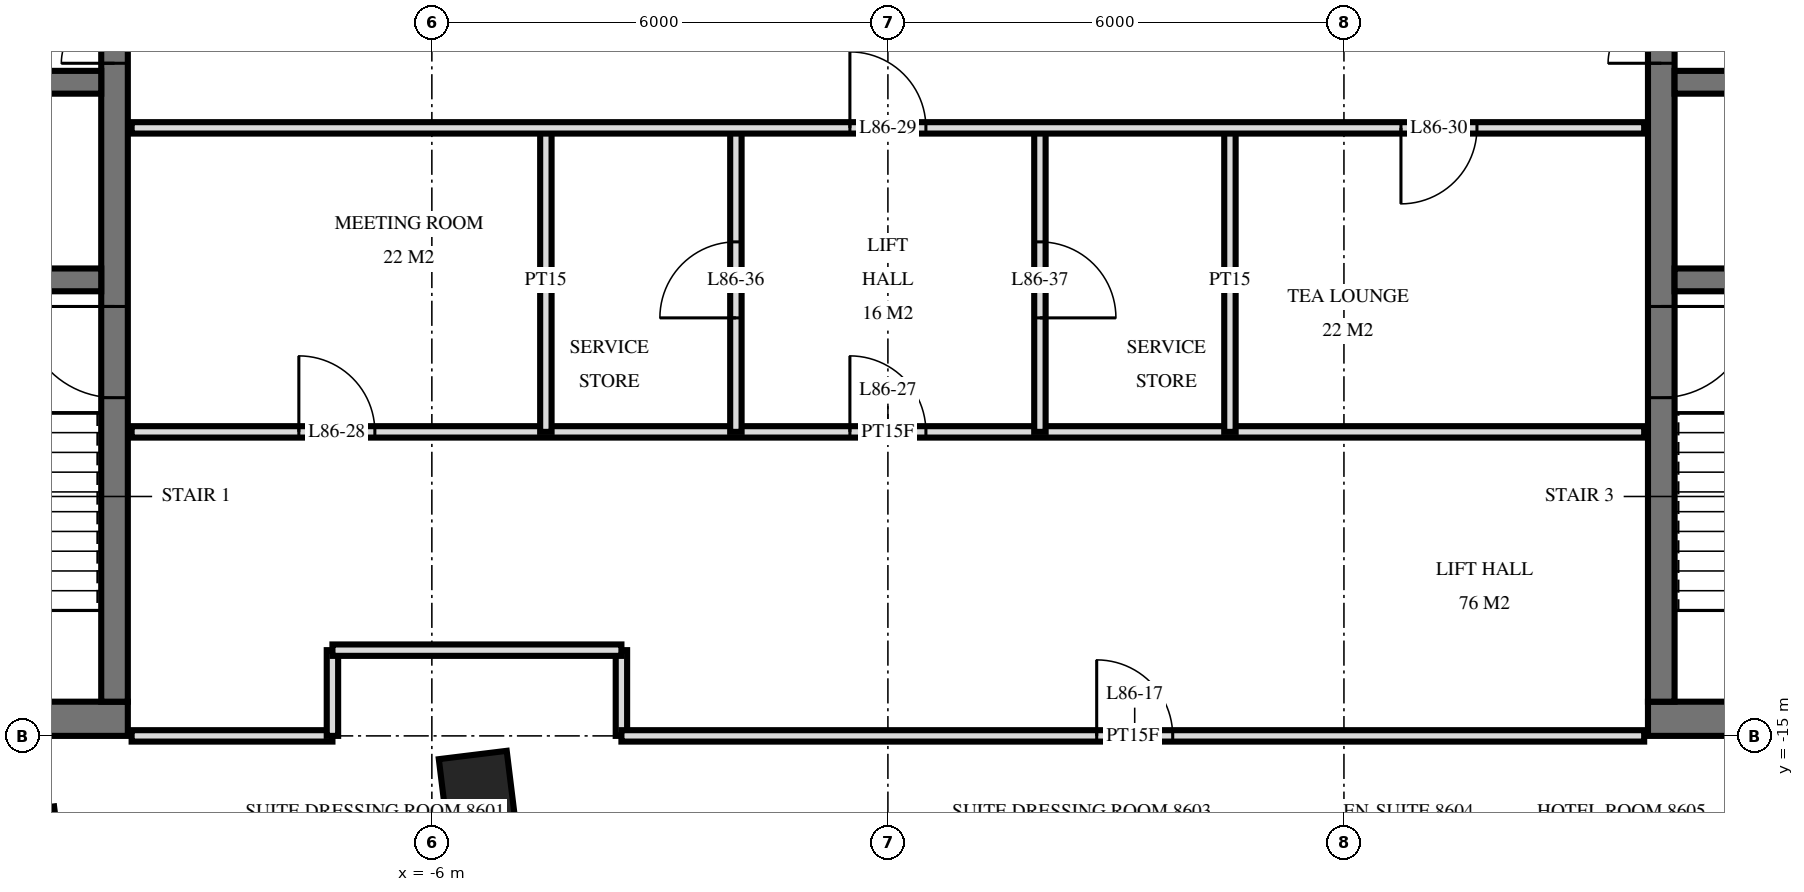
"""IFC4 building model, lengths in metres.
Left out: names, types, materials, properties, quantities, classifications, styles, units other than length and angle.
Written with IfcOpenShell. Run it as: python <this file> out.ifc"""

import sys

from ifc_helpers import new_model, si_unit, direction, frame, frame_2d, origin, origin_2d, place, context, subcontext, project, spatial, rectangle, extrude, element, fill, save


model = new_model("IFC4")
c1 = context("Model", 3, precision=1e-05, world=origin(), true_north=direction((0.0, 1.0)))
c2 = subcontext(c1, "Body", "Model", "MODEL_VIEW")
j1 = project(units=[si_unit("LENGTHUNIT", "METRE"), si_unit("PLANEANGLEUNIT", "RADIAN")], contexts=[c1])
p1 = place(None, origin())
s1 = spatial("IfcSite", under=j1, at=p1, CompositionType="ELEMENT")
p2 = place(p1, origin())
s2 = spatial("IfcBuilding", under=s1, at=p2, CompositionType="ELEMENT")
p3 = place(p2, frame((0.0, 0.0, 326.6)))
s3 = spatial("IfcBuildingStorey", under=s2, at=p3, CompositionType="ELEMENT", Elevation=326.6)
for number, where, z_axis, x_axis in (
    (1, (-11.362, -16.429, 0.0), (0.0, 0.0, 1.0), (0.993, 0.122, 0.0)),
    (2, (-5.407, -15.698, 0.0), (0.0, 0.0, 1.0), (0.993, 0.122, 0.0)),
):
    element("IfcColumn", number, at=place(p3, frame(where, z_axis=z_axis, x_axis=x_axis)), inside=s3, PredefinedType="COLUMN", context=c2, shape_type="SweptSolid", body=[
        extrude(rectangle(XDim=0.9, YDim=0.9, at=origin_2d()), origin(), (0.0, 0.0, 1.0), 4.0),
    ])
p4 = place(p3, frame((-19.5, -14.775, 0.0), z_axis=(0.0, 0.0, 1.0), x_axis=(1.0, 0.0, 0.0)))
e3 = element("IfcWall", 3, at=p4, inside=s3, PredefinedType="SHEAR", context=c2, shape_type="SweptSolid", body=[
    extrude(rectangle(XDim=9.5, YDim=0.45, at=frame_2d((4.75, 0.0))), origin(), (0.0, 0.0, 1.0), 4.0),
])
p5 = place(p4, frame((1.2, 0.0, 0.0)))
e4 = element("IfcOpeningElement", 4, at=p5, cuts=e3, PredefinedType="OPENING", context=c2, shape_type="SweptSolid", body=[
    extrude(rectangle(XDim=1.2, YDim=2.1, at=frame_2d((0.6, 1.05))), frame((0.0, 0.235, 0.0), z_axis=(0.0, -1.0, 0.0), x_axis=(1.0, 0.0, 0.0)), (0.0, 0.0, 1.0), 0.47),
])
p6 = place(p4, frame((4.25, 0.0, 0.0)))
e5 = element("IfcOpeningElement", 5, at=p6, cuts=e3, PredefinedType="OPENING", context=c2, shape_type="SweptSolid", body=[
    extrude(rectangle(XDim=1.1, YDim=2.1, at=frame_2d((0.55, 1.05))), frame((0.0, 0.235, 0.0), z_axis=(0.0, -1.0, 0.0), x_axis=(1.0, 0.0, 0.0)), (0.0, 0.0, 1.0), 0.47),
])
p7 = place(p3, frame((-10.175, -14.55, 0.0), z_axis=(0.0, 0.0, 1.0), x_axis=(0.0, 1.0, 0.0)))
e6 = element("IfcWall", 6, at=p7, inside=s3, PredefinedType="SHEAR", context=c2, shape_type="SweptSolid", body=[
    extrude(rectangle(XDim=14.1, YDim=0.35, at=frame_2d((7.05, 0.0))), origin(), (0.0, 0.0, 1.0), 4.0),
])
p8 = place(p7, frame((8.4, 0.0, 0.0)))
e7 = element("IfcOpeningElement", 7, at=p8, cuts=e6, PredefinedType="OPENING", context=c2, shape_type="SweptSolid", body=[
    extrude(rectangle(XDim=1.4, YDim=2.4, at=frame_2d((0.7, 1.2))), frame((0.0, 0.185, 0.0), z_axis=(0.0, -1.0, 0.0), x_axis=(1.0, 0.0, 0.0)), (0.0, 0.0, 1.0), 0.37),
])
p9 = place(p7, frame((10.0, 0.0, 0.0)))
e8 = element("IfcOpeningElement", 8, at=p9, cuts=e6, PredefinedType="OPENING", context=c2, shape_type="SweptSolid", body=[
    extrude(rectangle(XDim=1.4, YDim=2.4, at=frame_2d((0.7, 1.2))), frame((0.0, 0.185, 0.0), z_axis=(0.0, -1.0, 0.0), x_axis=(1.0, 0.0, 0.0)), (0.0, 0.0, 1.0), 0.37),
])
p10 = place(p7, frame((4.0, 0.0, 0.0)))
e9 = element("IfcOpeningElement", 9, at=p10, cuts=e6, PredefinedType="OPENING", context=c2, shape_type="SweptSolid", body=[
    extrude(rectangle(XDim=1.2, YDim=2.1, at=frame_2d((0.6, 1.05))), frame((0.0, 0.185, 0.0), z_axis=(0.0, -1.0, 0.0), x_axis=(1.0, 0.0, 0.0)), (0.0, 0.0, 1.0), 0.37),
])
p11 = place(p3, frame((-19.05, -6.4, 0.0), z_axis=(0.0, 0.0, 1.0), x_axis=(1.0, 0.0, 0.0)))
e10 = element("IfcWall", 10, at=p11, inside=s3, PredefinedType="SHEAR", context=c2, shape_type="SweptSolid", body=[
    extrude(rectangle(XDim=8.7, YDim=0.3, at=frame_2d((4.35, 0.0))), origin(), (0.0, 0.0, 1.0), 4.0),
])
p12 = place(p11, frame((0.8, 0.0, 0.0)))
e11 = element("IfcOpeningElement", 11, at=p12, cuts=e10, PredefinedType="OPENING", context=c2, shape_type="SweptSolid", body=[
    extrude(rectangle(XDim=1.1, YDim=2.1, at=frame_2d((0.55, 1.05))), frame((0.0, 0.16, 0.0), z_axis=(0.0, -1.0, 0.0), x_axis=(1.0, 0.0, 0.0)), (0.0, 0.0, 1.0), 0.32),
])
p13 = place(p3, frame((-19.05, -9.0, 0.0), z_axis=(0.0, 0.0, 1.0), x_axis=(1.0, 0.0, 0.0)))
e12 = element("IfcWall", 12, at=p13, inside=s3, PredefinedType="SHEAR", context=c2, shape_type="SweptSolid", body=[
    extrude(rectangle(XDim=8.7, YDim=0.3, at=frame_2d((4.35, 0.0))), origin(), (0.0, 0.0, 1.0), 4.0),
])
p14 = place(p13, frame((3.8, 0.0, 0.0)))
e13 = element("IfcOpeningElement", 13, at=p14, cuts=e12, PredefinedType="OPENING", context=c2, shape_type="SweptSolid", body=[
    extrude(rectangle(XDim=1.1, YDim=2.1, at=frame_2d((0.55, 1.05))), frame((0.0, 0.16, 0.0), z_axis=(0.0, -1.0, 0.0), x_axis=(1.0, 0.0, 0.0)), (0.0, 0.0, 1.0), 0.32),
])
p15 = place(p3, frame((10.0, -14.775, 0.0), z_axis=(0.0, 0.0, 1.0), x_axis=(1.0, 0.0, 0.0)))
e14 = element("IfcWall", 14, at=p15, inside=s3, PredefinedType="SHEAR", context=c2, shape_type="SweptSolid", body=[
    extrude(rectangle(XDim=9.5, YDim=0.45, at=frame_2d((4.75, 0.0))), origin(), (0.0, 0.0, 1.0), 4.0),
])
p16 = place(p15, frame((7.1, 0.0, 0.0)))
e15 = element("IfcOpeningElement", 15, at=p16, cuts=e14, PredefinedType="OPENING", context=c2, shape_type="SweptSolid", body=[
    extrude(rectangle(XDim=1.2, YDim=2.1, at=frame_2d((0.6, 1.05))), frame((0.0, 0.235, 0.0), z_axis=(0.0, -1.0, 0.0), x_axis=(1.0, 0.0, 0.0)), (0.0, 0.0, 1.0), 0.47),
])
p17 = place(p15, frame((4.15, 0.0, 0.0)))
e16 = element("IfcOpeningElement", 16, at=p17, cuts=e14, PredefinedType="OPENING", context=c2, shape_type="SweptSolid", body=[
    extrude(rectangle(XDim=1.1, YDim=2.1, at=frame_2d((0.55, 1.05))), frame((0.0, 0.235, 0.0), z_axis=(0.0, -1.0, 0.0), x_axis=(1.0, 0.0, 0.0)), (0.0, 0.0, 1.0), 0.47),
])
p18 = place(p3, frame((10.175, -14.55, 0.0), z_axis=(0.0, 0.0, 1.0), x_axis=(0.0, 1.0, 0.0)))
e17 = element("IfcWall", 17, at=p18, inside=s3, PredefinedType="SHEAR", context=c2, shape_type="SweptSolid", body=[
    extrude(rectangle(XDim=14.1, YDim=0.35, at=frame_2d((7.05, 0.0))), origin(), (0.0, 0.0, 1.0), 4.0),
])
p19 = place(p18, frame((8.4, 0.0, 0.0)))
e18 = element("IfcOpeningElement", 18, at=p19, cuts=e17, PredefinedType="OPENING", context=c2, shape_type="SweptSolid", body=[
    extrude(rectangle(XDim=1.4, YDim=2.4, at=frame_2d((0.7, 1.2))), frame((0.0, 0.185, 0.0), z_axis=(0.0, -1.0, 0.0), x_axis=(1.0, 0.0, 0.0)), (0.0, 0.0, 1.0), 0.37),
])
p20 = place(p18, frame((10.0, 0.0, 0.0)))
e19 = element("IfcOpeningElement", 19, at=p20, cuts=e17, PredefinedType="OPENING", context=c2, shape_type="SweptSolid", body=[
    extrude(rectangle(XDim=1.4, YDim=2.4, at=frame_2d((0.7, 1.2))), frame((0.0, 0.185, 0.0), z_axis=(0.0, -1.0, 0.0), x_axis=(1.0, 0.0, 0.0)), (0.0, 0.0, 1.0), 0.37),
])
p21 = place(p18, frame((4.0, 0.0, 0.0)))
e20 = element("IfcOpeningElement", 20, at=p21, cuts=e17, PredefinedType="OPENING", context=c2, shape_type="SweptSolid", body=[
    extrude(rectangle(XDim=1.2, YDim=2.1, at=frame_2d((0.6, 1.05))), frame((0.0, 0.185, 0.0), z_axis=(0.0, -1.0, 0.0), x_axis=(1.0, 0.0, 0.0)), (0.0, 0.0, 1.0), 0.37),
])
p22 = place(p3, frame((10.35, -6.4, 0.0), z_axis=(0.0, 0.0, 1.0), x_axis=(1.0, 0.0, 0.0)))
e21 = element("IfcWall", 21, at=p22, inside=s3, PredefinedType="SHEAR", context=c2, shape_type="SweptSolid", body=[
    extrude(rectangle(XDim=8.7, YDim=0.3, at=frame_2d((4.35, 0.0))), origin(), (0.0, 0.0, 1.0), 4.0),
])
p23 = place(p22, frame((6.8, 0.0, 0.0)))
e22 = element("IfcOpeningElement", 22, at=p23, cuts=e21, PredefinedType="OPENING", context=c2, shape_type="SweptSolid", body=[
    extrude(rectangle(XDim=1.1, YDim=2.1, at=frame_2d((0.55, 1.05))), frame((0.0, 0.16, 0.0), z_axis=(0.0, -1.0, 0.0), x_axis=(1.0, 0.0, 0.0)), (0.0, 0.0, 1.0), 0.32),
])
p24 = place(p3, frame((10.35, -9.0, 0.0), z_axis=(0.0, 0.0, 1.0), x_axis=(1.0, 0.0, 0.0)))
e23 = element("IfcWall", 23, at=p24, inside=s3, PredefinedType="SHEAR", context=c2, shape_type="SweptSolid", body=[
    extrude(rectangle(XDim=8.7, YDim=0.3, at=frame_2d((4.35, 0.0))), origin(), (0.0, 0.0, 1.0), 4.0),
])
p25 = place(p24, frame((3.8, 0.0, 0.0)))
e24 = element("IfcOpeningElement", 24, at=p25, cuts=e23, PredefinedType="OPENING", context=c2, shape_type="SweptSolid", body=[
    extrude(rectangle(XDim=1.1, YDim=2.1, at=frame_2d((0.55, 1.05))), frame((0.0, 0.16, 0.0), z_axis=(0.0, -1.0, 0.0), x_axis=(1.0, 0.0, 0.0)), (0.0, 0.0, 1.0), 0.32),
])
p26 = place(p3, frame((4.5, -11.0, 0.0), z_axis=(0.0, 0.0, 1.0), x_axis=(0.0, 1.0, 0.0)))
e25 = element("IfcWall", 25, at=p26, inside=s3, PredefinedType="PARTITIONING", context=c2, shape_type="SweptSolid", body=[
    extrude(rectangle(XDim=4.0, YDim=0.15, at=frame_2d((2.0, 0.0))), origin(), (0.0, 0.0, 1.0), 3.72),
])
p27 = place(p3, frame((2.0, -11.0, 0.0), z_axis=(0.0, 0.0, 1.0), x_axis=(0.0, 1.0, 0.0)))
e26 = element("IfcWall", 26, at=p27, inside=s3, PredefinedType="PARTITIONING", context=c2, shape_type="SweptSolid", body=[
    extrude(rectangle(XDim=4.0, YDim=0.15, at=frame_2d((2.0, 0.0))), origin(), (0.0, 0.0, 1.0), 3.72),
])
p28 = place(p27, frame((1.5, 0.0, 0.0)))
e27 = element("IfcOpeningElement", 27, at=p28, cuts=e26, PredefinedType="OPENING", context=c2, shape_type="SweptSolid", body=[
    extrude(rectangle(XDim=1.0, YDim=2.1, at=frame_2d((0.5, 1.05))), frame((0.0, 0.085, 0.0), z_axis=(0.0, -1.0, 0.0), x_axis=(1.0, 0.0, 0.0)), (0.0, 0.0, 1.0), 0.17),
])
p29 = place(p3, frame((-2.0, -11.0, 0.0), z_axis=(0.0, 0.0, 1.0), x_axis=(0.0, 1.0, 0.0)))
e28 = element("IfcWall", 28, at=p29, inside=s3, PredefinedType="PARTITIONING", context=c2, shape_type="SweptSolid", body=[
    extrude(rectangle(XDim=4.0, YDim=0.15, at=frame_2d((2.0, 0.0))), origin(), (0.0, 0.0, 1.0), 3.72),
])
p30 = place(p29, frame((1.5, 0.0, 0.0)))
e29 = element("IfcOpeningElement", 29, at=p30, cuts=e28, PredefinedType="OPENING", context=c2, shape_type="SweptSolid", body=[
    extrude(rectangle(XDim=1.0, YDim=2.1, at=frame_2d((0.5, 1.05))), frame((0.0, 0.085, 0.0), z_axis=(0.0, -1.0, 0.0), x_axis=(1.0, 0.0, 0.0)), (0.0, 0.0, 1.0), 0.17),
])
p31 = place(p3, frame((-3.506, -15.0, 0.0), z_axis=(0.0, 0.0, 1.0), x_axis=(0.0, 1.0, 0.0)))
e30 = element("IfcWall", 30, at=p31, inside=s3, PredefinedType="PARTITIONING", context=c2, shape_type="SweptSolid", body=[
    extrude(rectangle(XDim=1.128, YDim=0.15, at=frame_2d((0.564, 0.0))), origin(), (0.0, 0.0, 1.0), 3.72),
])
p32 = place(p3, frame((-4.5, -11.0, 0.0), z_axis=(0.0, 0.0, 1.0), x_axis=(0.0, 1.0, 0.0)))
e31 = element("IfcWall", 31, at=p32, inside=s3, PredefinedType="PARTITIONING", context=c2, shape_type="SweptSolid", body=[
    extrude(rectangle(XDim=4.0, YDim=0.15, at=frame_2d((2.0, 0.0))), origin(), (0.0, 0.0, 1.0), 3.72),
])
p33 = place(p3, frame((-7.308, -15.0, 0.0), z_axis=(0.0, 0.0, 1.0), x_axis=(0.0, 1.0, 0.0)))
e32 = element("IfcWall", 32, at=p33, inside=s3, PredefinedType="PARTITIONING", context=c2, shape_type="SweptSolid", body=[
    extrude(rectangle(XDim=1.128, YDim=0.15, at=frame_2d((0.564, 0.0))), origin(), (0.0, 0.0, 1.0), 3.72),
])
p34 = place(p3, frame((-9.95, -15.0, 0.0), z_axis=(0.0, 0.0, 1.0), x_axis=(1.0, 0.0, 0.0)))
e33 = element("IfcWall", 33, at=p34, inside=s3, PredefinedType="PARTITIONING", context=c2, shape_type="SweptSolid", body=[
    extrude(rectangle(XDim=2.642, YDim=0.15, at=frame_2d((1.321, 0.0))), origin(), (0.0, 0.0, 1.0), 3.084),
])
p35 = place(p3, frame((-3.506, -15.0, 0.0), z_axis=(0.0, 0.0, 1.0), x_axis=(1.0, 0.0, 0.0)))
e34 = element("IfcWall", 34, at=p35, inside=s3, PredefinedType="PARTITIONING", context=c2, shape_type="SweptSolid", body=[
    extrude(rectangle(XDim=13.456, YDim=0.15, at=frame_2d((6.728, 0.0))), origin(), (0.0, 0.0, 1.0), 3.084),
])
p36 = place(p35, frame((6.253, 0.0, 0.0)))
e35 = element("IfcOpeningElement", 35, at=p36, cuts=e34, PredefinedType="OPENING", context=c2, shape_type="SweptSolid", body=[
    extrude(rectangle(XDim=1.0, YDim=2.1, at=frame_2d((0.5, 1.05))), frame((0.0, 0.085, 0.0), z_axis=(0.0, -1.0, 0.0), x_axis=(1.0, 0.0, 0.0)), (0.0, 0.0, 1.0), 0.17),
])
p37 = place(p3, frame((-7.308, -13.872, 0.0), z_axis=(0.0, 0.0, 1.0), x_axis=(1.0, 0.0, 0.0)))
e36 = element("IfcWall", 36, at=p37, inside=s3, PredefinedType="PARTITIONING", context=c2, shape_type="SweptSolid", body=[
    extrude(rectangle(XDim=3.802, YDim=0.15, at=frame_2d((1.901, 0.0))), origin(), (0.0, 0.0, 1.0), 3.72),
])
p38 = place(p3, frame((-9.95, -11.0, 0.0), z_axis=(0.0, 0.0, 1.0), x_axis=(1.0, 0.0, 0.0)))
e37 = element("IfcWall", 37, at=p38, inside=s3, PredefinedType="PARTITIONING", context=c2, shape_type="SweptSolid", body=[
    extrude(rectangle(XDim=19.9, YDim=0.15, at=frame_2d((9.95, 0.0))), origin(), (0.0, 0.0, 1.0), 3.72),
])
p39 = place(p38, frame((9.45, 0.0, 0.0)))
e38 = element("IfcOpeningElement", 38, at=p39, cuts=e37, PredefinedType="OPENING", context=c2, shape_type="SweptSolid", body=[
    extrude(rectangle(XDim=1.0, YDim=2.1, at=frame_2d((0.5, 1.05))), frame((0.0, 0.085, 0.0), z_axis=(0.0, -1.0, 0.0), x_axis=(1.0, 0.0, 0.0)), (0.0, 0.0, 1.0), 0.17),
])
p40 = place(p38, frame((2.2, 0.0, 0.0)))
e39 = element("IfcOpeningElement", 39, at=p40, cuts=e37, PredefinedType="OPENING", context=c2, shape_type="SweptSolid", body=[
    extrude(rectangle(XDim=1.0, YDim=2.1, at=frame_2d((0.5, 1.05))), frame((0.0, 0.085, 0.0), z_axis=(0.0, -1.0, 0.0), x_axis=(1.0, 0.0, 0.0)), (0.0, 0.0, 1.0), 0.17),
])
p41 = place(p3, frame((-9.95, -7.0, 0.0), z_axis=(0.0, 0.0, 1.0), x_axis=(1.0, 0.0, 0.0)))
e40 = element("IfcWall", 40, at=p41, inside=s3, PredefinedType="PARTITIONING", context=c2, shape_type="SweptSolid", body=[
    extrude(rectangle(XDim=19.9, YDim=0.15, at=frame_2d((9.95, 0.0))), origin(), (0.0, 0.0, 1.0), 3.72),
])
p42 = place(p41, frame((9.45, 0.0, 0.0)))
e41 = element("IfcOpeningElement", 41, at=p42, cuts=e40, PredefinedType="OPENING", context=c2, shape_type="SweptSolid", body=[
    extrude(rectangle(XDim=1.0, YDim=2.1, at=frame_2d((0.5, 1.05))), frame((0.0, 0.085, 0.0), z_axis=(0.0, -1.0, 0.0), x_axis=(1.0, 0.0, 0.0)), (0.0, 0.0, 1.0), 0.17),
])
p43 = place(p41, frame((16.7, 0.0, 0.0)))
e42 = element("IfcOpeningElement", 42, at=p43, cuts=e40, PredefinedType="OPENING", context=c2, shape_type="SweptSolid", body=[
    extrude(rectangle(XDim=1.0, YDim=2.1, at=frame_2d((0.5, 1.05))), frame((0.0, 0.085, 0.0), z_axis=(0.0, -1.0, 0.0), x_axis=(1.0, 0.0, 0.0)), (0.0, 0.0, 1.0), 0.17),
])
p44 = place(p8, origin())
e43 = element("IfcDoor", 43, at=p44, inside=s3, OperationType="DOUBLE_DOOR_SINGLE_SWING", PredefinedType="DOOR", context=c2, shape_type="SweptSolid", body=[
    extrude(rectangle(XDim=1.4, YDim=2.4, at=frame_2d((0.7, 1.2))), frame((0.0, 0.025, 0.0), z_axis=(0.0, -1.0, 0.0), x_axis=(1.0, 0.0, 0.0)), (0.0, 0.0, 1.0), 0.05),
])
fill(e7, e43)
p45 = place(p10, origin())
e44 = element("IfcDoor", 44, at=p45, inside=s3, OperationType="SINGLE_SWING_LEFT", PredefinedType="DOOR", context=c2, shape_type="SweptSolid", body=[
    extrude(rectangle(XDim=1.2, YDim=2.1, at=frame_2d((0.6, 1.05))), frame((0.0, 0.025, 0.0), z_axis=(0.0, -1.0, 0.0), x_axis=(1.0, 0.0, 0.0)), (0.0, 0.0, 1.0), 0.05),
])
fill(e9, e44)
p46 = place(p19, origin())
e45 = element("IfcDoor", 45, at=p46, inside=s3, OperationType="DOUBLE_DOOR_SINGLE_SWING", PredefinedType="DOOR", context=c2, shape_type="SweptSolid", body=[
    extrude(rectangle(XDim=1.4, YDim=2.4, at=frame_2d((0.7, 1.2))), frame((0.0, 0.025, 0.0), z_axis=(0.0, -1.0, 0.0), x_axis=(1.0, 0.0, 0.0)), (0.0, 0.0, 1.0), 0.05),
])
fill(e18, e45)
p47 = place(p21, frame((0.6, 0.0, 0.0), z_axis=(0.0, 0.0, 1.0), x_axis=(-1.0, 0.0, 0.0)))
e46 = element("IfcDoor", 46, at=p47, inside=s3, OperationType="SINGLE_SWING_RIGHT", PredefinedType="DOOR", context=c2, shape_type="SweptSolid", body=[
    extrude(rectangle(XDim=1.2, YDim=2.1, at=frame_2d((0.0, 1.05))), frame((0.0, -0.025, 0.0), z_axis=(0.0, 1.0, 0.0), x_axis=(-1.0, 0.0, 0.0)), (0.0, 0.0, 1.0), 0.05),
])
fill(e20, e46)
p48 = place(p36, origin())
e47 = element("IfcDoor", 47, at=p48, inside=s3, OperationType="SINGLE_SWING_RIGHT", PredefinedType="DOOR", context=c2, shape_type="SweptSolid", body=[
    extrude(rectangle(XDim=1.0, YDim=2.1, at=frame_2d((0.5, 1.05))), frame((0.0, 0.025, 0.0), z_axis=(0.0, -1.0, 0.0), x_axis=(1.0, 0.0, 0.0)), (0.0, 0.0, 1.0), 0.05),
])
fill(e35, e47)
p49 = place(p39, origin())
e48 = element("IfcDoor", 48, at=p49, inside=s3, OperationType="SINGLE_SWING_RIGHT", PredefinedType="DOOR", context=c2, shape_type="SweptSolid", body=[
    extrude(rectangle(XDim=1.0, YDim=2.1, at=frame_2d((0.5, 1.05))), frame((0.0, 0.025, 0.0), z_axis=(0.0, -1.0, 0.0), x_axis=(1.0, 0.0, 0.0)), (0.0, 0.0, 1.0), 0.05),
])
fill(e38, e48)
p50 = place(p40, origin())
e49 = element("IfcDoor", 49, at=p50, inside=s3, OperationType="SINGLE_SWING_RIGHT", PredefinedType="DOOR", context=c2, shape_type="SweptSolid", body=[
    extrude(rectangle(XDim=1.0, YDim=2.1, at=frame_2d((0.5, 1.05))), frame((0.0, 0.025, 0.0), z_axis=(0.0, -1.0, 0.0), x_axis=(1.0, 0.0, 0.0)), (0.0, 0.0, 1.0), 0.05),
])
fill(e39, e49)
p51 = place(p42, origin())
e50 = element("IfcDoor", 50, at=p51, inside=s3, OperationType="SINGLE_SWING_RIGHT", PredefinedType="DOOR", context=c2, shape_type="SweptSolid", body=[
    extrude(rectangle(XDim=1.0, YDim=2.1, at=frame_2d((0.5, 1.05))), frame((0.0, 0.025, 0.0), z_axis=(0.0, -1.0, 0.0), x_axis=(1.0, 0.0, 0.0)), (0.0, 0.0, 1.0), 0.05),
])
fill(e41, e50)
p52 = place(p43, frame((0.5, 0.0, 0.0), z_axis=(0.0, 0.0, 1.0), x_axis=(-1.0, 0.0, 0.0)))
e51 = element("IfcDoor", 51, at=p52, inside=s3, OperationType="SINGLE_SWING_LEFT", PredefinedType="DOOR", context=c2, shape_type="SweptSolid", body=[
    extrude(rectangle(XDim=1.0, YDim=2.1, at=frame_2d((0.0, 1.05))), frame((0.0, -0.025, 0.0), z_axis=(0.0, 1.0, 0.0), x_axis=(-1.0, 0.0, 0.0)), (0.0, 0.0, 1.0), 0.05),
])
fill(e42, e51)
p53 = place(p30, origin())
e52 = element("IfcDoor", 52, at=p53, inside=s3, OperationType="SINGLE_SWING_RIGHT", PredefinedType="DOOR", context=c2, shape_type="SweptSolid", body=[
    extrude(rectangle(XDim=1.0, YDim=2.1, at=frame_2d((0.5, 1.05))), frame((0.0, 0.025, 0.0), z_axis=(0.0, -1.0, 0.0), x_axis=(1.0, 0.0, 0.0)), (0.0, 0.0, 1.0), 0.05),
])
fill(e29, e52)
p54 = place(p28, frame((0.5, 0.0, 0.0), z_axis=(0.0, 0.0, 1.0), x_axis=(-1.0, 0.0, 0.0)))
e53 = element("IfcDoor", 53, at=p54, inside=s3, OperationType="SINGLE_SWING_LEFT", PredefinedType="DOOR", context=c2, shape_type="SweptSolid", body=[
    extrude(rectangle(XDim=1.0, YDim=2.1, at=frame_2d((0.0, 1.05))), frame((0.0, -0.025, 0.0), z_axis=(0.0, 1.0, 0.0), x_axis=(-1.0, 0.0, 0.0)), (0.0, 0.0, 1.0), 0.05),
])
fill(e27, e53)
save(model, sys.argv[1])
